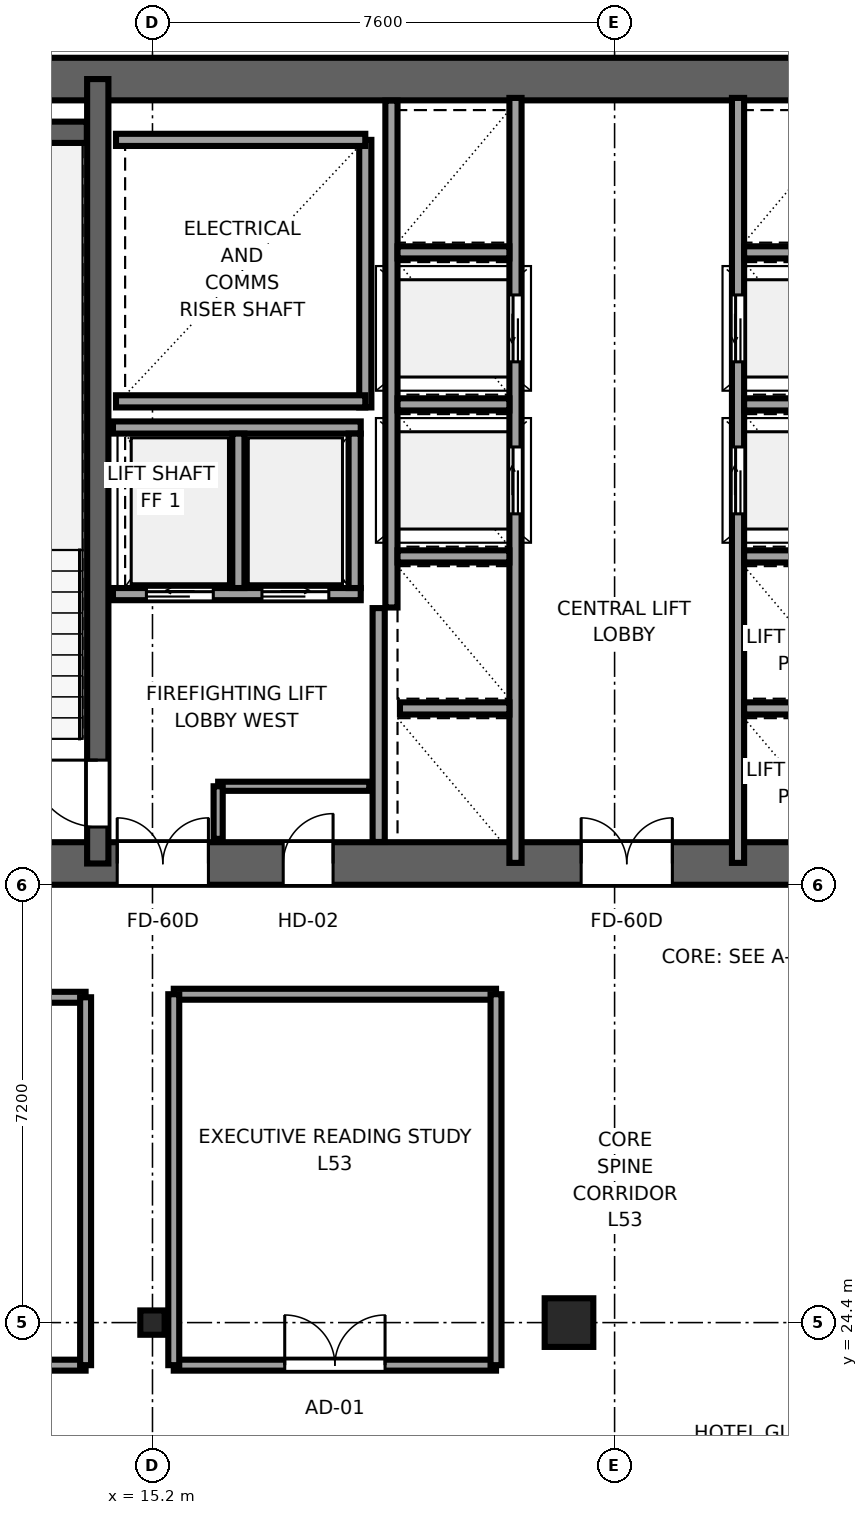
"""IFC4 building model, lengths in metres.
Left out: names, types, materials, properties, quantities, classifications, styles, units other than length and angle.
Written with IfcOpenShell. Run it as: python <this file> out.ifc"""

import sys

from ifc_helpers import new_model, si_unit, direction, frame, frame_2d, origin, origin_2d, place, context, subcontext, project, spatial, rectangle, i_section, extrude, source, transform, mapped, element, fill, save


model = new_model("IFC4")
c1 = context("Model", 3, precision=1e-05, world=origin(), true_north=direction((0.0, 1.0)))
c2 = subcontext(c1, "Body", "Model", "MODEL_VIEW")
j1 = project(units=[si_unit("LENGTHUNIT", "METRE"), si_unit("PLANEANGLEUNIT", "RADIAN")], contexts=[c1])
p1 = place(None, origin())
s1 = spatial("IfcSite", under=j1, at=p1, CompositionType="ELEMENT")
p2 = place(p1, origin())
s2 = spatial("IfcBuilding", under=s1, at=p2, CompositionType="ELEMENT")
p3 = place(p2, frame((0.0, 0.0, 201.75)))
s3 = spatial("IfcBuildingStorey", under=s2, at=p3, CompositionType="ELEMENT", Elevation=201.75)
p4 = place(p3, frame((9.8, 31.95, 0.0), z_axis=(0.0, 0.0, 1.0), x_axis=(1.0, 0.0, 0.0)))
e1 = element("IfcWall", 1, at=p4, inside=s3, PredefinedType="SHEAR", context=c2, shape_type="SweptSolid", body=[
    extrude(rectangle(XDim=26.4, YDim=0.7, at=frame_2d((13.2, 0.0))), origin(), (0.0, 0.0, 1.0), 3.55),
])
p5 = place(p4, frame((6.32, 0.0, 0.0), z_axis=(0.0, 0.0, 1.0), x_axis=(-1.0, 0.0, 0.0)))
e2 = element("IfcOpeningElement", 2, at=p5, cuts=e1, PredefinedType="OPENING", context=c2, shape_type="SweptSolid", body=[
    extrude(rectangle(XDim=1.5, YDim=2.04, at=frame_2d((0.75, 1.02))), frame((0.0, 0.36, 0.0), z_axis=(0.0, -1.0, 0.0), x_axis=(1.0, 0.0, 0.0)), (0.0, 0.0, 1.0), 0.72),
])
p6 = place(p4, frame((13.95, 0.0, 0.0), z_axis=(0.0, 0.0, 1.0), x_axis=(-1.0, 0.0, 0.0)))
e3 = element("IfcOpeningElement", 3, at=p6, cuts=e1, PredefinedType="OPENING", context=c2, shape_type="SweptSolid", body=[
    extrude(rectangle(XDim=1.5, YDim=2.04, at=frame_2d((0.75, 1.02))), frame((0.0, 0.36, 0.0), z_axis=(0.0, -1.0, 0.0), x_axis=(1.0, 0.0, 0.0)), (0.0, 0.0, 1.0), 0.72),
])
p7 = place(p4, frame((21.58, 0.0, 0.0), z_axis=(0.0, 0.0, 1.0), x_axis=(-1.0, 0.0, 0.0)))
e4 = element("IfcOpeningElement", 4, at=p7, cuts=e1, PredefinedType="OPENING", context=c2, shape_type="SweptSolid", body=[
    extrude(rectangle(XDim=1.5, YDim=2.04, at=frame_2d((0.75, 1.02))), frame((0.0, 0.36, 0.0), z_axis=(0.0, -1.0, 0.0), x_axis=(1.0, 0.0, 0.0)), (0.0, 0.0, 1.0), 0.72),
])
p8 = place(p4, frame((8.37, 0.0, 0.0), z_axis=(0.0, 0.0, 1.0), x_axis=(-1.0, 0.0, 0.0)))
e5 = element("IfcOpeningElement", 5, at=p8, cuts=e1, PredefinedType="OPENING", context=c2, shape_type="SweptSolid", body=[
    extrude(rectangle(XDim=0.82, YDim=2.01, at=frame_2d((0.41, 1.005))), frame((0.0, 0.36, 0.0), z_axis=(0.0, -1.0, 0.0), x_axis=(1.0, 0.0, 0.0)), (0.0, 0.0, 1.0), 0.72),
])
p9 = place(p4, frame((18.87, 0.0, 0.0), z_axis=(0.0, 0.0, 1.0), x_axis=(-1.0, 0.0, 0.0)))
e6 = element("IfcOpeningElement", 6, at=p9, cuts=e1, PredefinedType="OPENING", context=c2, shape_type="SweptSolid", body=[
    extrude(rectangle(XDim=0.82, YDim=2.01, at=frame_2d((0.41, 1.005))), frame((0.0, 0.36, 0.0), z_axis=(0.0, -1.0, 0.0), x_axis=(1.0, 0.0, 0.0)), (0.0, 0.0, 1.0), 0.72),
])
p10 = place(p3, frame((9.8, 44.85, 0.0), z_axis=(0.0, 0.0, 1.0), x_axis=(1.0, 0.0, 0.0)))
e7 = element("IfcWall", 7, at=p10, inside=s3, PredefinedType="SHEAR", context=c2, shape_type="SweptSolid", body=[
    extrude(rectangle(XDim=26.4, YDim=0.7, at=frame_2d((13.2, 0.0))), origin(), (0.0, 0.0, 1.0), 3.55),
])
p11 = place(p3, frame((14.3, 31.95, 0.0), z_axis=(0.0, 0.0, 1.0), x_axis=(0.0, 1.0, 0.0)))
e8 = element("IfcWall", 8, at=p11, inside=s3, PredefinedType="SHEAR", context=c2, shape_type="SweptSolid", body=[
    extrude(rectangle(XDim=12.9, YDim=0.35, at=frame_2d((6.45, 0.0))), origin(), (0.0, 0.0, 1.0), 3.55),
])
p12 = place(p11, frame((0.6, 0.0, 0.0)))
e9 = element("IfcOpeningElement", 9, at=p12, cuts=e8, PredefinedType="OPENING", context=c2, shape_type="SweptSolid", body=[
    extrude(rectangle(XDim=1.1, YDim=2.12, at=frame_2d((0.55, 1.06))), frame((0.0, 0.185, 0.0), z_axis=(0.0, -1.0, 0.0), x_axis=(1.0, 0.0, 0.0)), (0.0, 0.0, 1.0), 0.37),
])
p13 = place(p3, frame((10.52, 43.975, 0.0), z_axis=(0.0, 0.0, 1.0), x_axis=(1.0, 0.0, 0.0)))
e10 = element("IfcWall", 10, at=p13, inside=s3, PredefinedType="SHEAR", context=c2, shape_type="SweptSolid", body=[
    extrude(rectangle(XDim=3.6, YDim=0.35, at=frame_2d((1.8, 0.0))), origin(), (0.0, 0.0, 1.0), 3.55),
])
m1 = source(origin(), c2, "Body", "SweptSolid", [
    extrude(i_section(OverallWidth=0.4, OverallDepth=0.4, WebThickness=0.02, FlangeThickness=0.035, at=origin_2d()), origin(), (0.0, 0.0, 1.0), 3.55),
])
p14 = place(p3, frame((15.2, 24.4, 0.0), z_axis=(0.0, 0.0, 1.0), x_axis=(1.0, 0.0, 0.0)))
e11 = element("IfcColumn", 11, at=p14, inside=s3, PredefinedType="COLUMN", context=c2, shape_type="MappedRepresentation", body=[
    mapped(m1, transform((0.0, 0.0, 0.0), x_axis=(1.0, 0.0, 0.0), y_axis=(0.0, 1.0, 0.0), z_axis=(0.0, 0.0, 1.0), scale=1.0)),
])
m2 = source(origin(), c2, "Body", "SweptSolid", [
    extrude(rectangle(XDim=0.8, YDim=0.8, at=origin_2d()), origin(), (0.0, 0.0, 1.0), 3.55),
])
p15 = place(p3, frame((22.05, 24.4, 0.0), z_axis=(0.0, 0.0, 1.0), x_axis=(1.0, 0.0, 0.0)))
e12 = element("IfcColumn", 12, at=p15, inside=s3, PredefinedType="COLUMN", context=c2, shape_type="MappedRepresentation", body=[
    mapped(m2, transform((0.0, 0.0, 0.0), x_axis=(1.0, 0.0, 0.0), y_axis=(0.0, 1.0, 0.0), z_axis=(0.0, 0.0, 1.0), scale=1.0)),
])
p16 = place(p3, frame((18.7, 39.45, 0.0), z_axis=(0.0, 0.0, 1.0), x_axis=(0.0, 1.0, 0.0)))
e13 = element("IfcWall", 13, at=p16, inside=s3, PredefinedType="SOLIDWALL", context=c2, shape_type="SweptSolid", body=[
    extrude(rectangle(XDim=4.4, YDim=0.2, at=frame_2d((2.2, 0.0))), origin(), (0.0, 0.0, 1.0), 3.29),
])
for number, where, z_axis, x_axis in (
    (14, (14.6, 39.55, 0.0), (0.0, 0.0, 1.0), (1.0, 0.0, 0.0)),
    (15, (14.6, 43.85, 0.0), (0.0, 0.0, 1.0), (1.0, 0.0, 0.0)),
):
    element("IfcWall", number, at=place(p3, frame(where, z_axis=z_axis, x_axis=x_axis)), inside=s3, PredefinedType="SOLIDWALL", context=c2, shape_type="SweptSolid", body=[
        extrude(rectangle(XDim=4.1, YDim=0.2, at=frame_2d((2.05, 0.0))), origin(), (0.0, 0.0, 1.0), 3.29),
    ])
p17 = place(p3, frame((18.92, 32.304, 0.0), z_axis=(0.0, 0.0, 1.0), x_axis=(0.0, 1.0, 0.0)))
e16 = element("IfcWall", 16, at=p17, inside=s3, PredefinedType="SOLIDWALL", context=c2, shape_type="SweptSolid", body=[
    extrude(rectangle(XDim=3.846, YDim=0.2, at=frame_2d((1.923, 0.0))), origin(), (0.0, 0.0, 1.0), 3.29),
])
p18 = place(p3, frame((21.17, 31.96, 0.0), z_axis=(0.0, 0.0, 1.0), x_axis=(0.0, 1.0, 0.0)))
e17 = element("IfcWall", 17, at=p18, inside=s3, PredefinedType="SOLIDWALL", context=c2, shape_type="SweptSolid", body=[
    extrude(rectangle(XDim=12.58, YDim=0.2, at=frame_2d((6.29, 0.0))), origin(), (0.0, 0.0, 1.0), 3.29),
])
p19 = place(p18, frame((5.74, 0.0, 0.0)))
e18 = element("IfcOpeningElement", 18, at=p19, cuts=e17, PredefinedType="OPENING", context=c2, shape_type="SweptSolid", body=[
    extrude(rectangle(XDim=1.1, YDim=2.12, at=frame_2d((0.55, 1.06))), frame((0.0, 0.11, 0.0), z_axis=(0.0, -1.0, 0.0), x_axis=(1.0, 0.0, 0.0)), (0.0, 0.0, 1.0), 0.22),
])
p20 = place(p18, frame((8.24, 0.0, 0.0)))
e19 = element("IfcOpeningElement", 19, at=p20, cuts=e17, PredefinedType="OPENING", context=c2, shape_type="SweptSolid", body=[
    extrude(rectangle(XDim=1.1, YDim=2.12, at=frame_2d((0.55, 1.06))), frame((0.0, 0.11, 0.0), z_axis=(0.0, -1.0, 0.0), x_axis=(1.0, 0.0, 0.0)), (0.0, 0.0, 1.0), 0.22),
])
p21 = place(p3, frame((19.13, 36.16, 0.0), z_axis=(0.0, 0.0, 1.0), x_axis=(0.0, 1.0, 0.0)))
e20 = element("IfcWall", 20, at=p21, inside=s3, PredefinedType="SOLIDWALL", context=c2, shape_type="SweptSolid", body=[
    extrude(rectangle(XDim=8.336, YDim=0.2, at=frame_2d((4.168, 0.0))), origin(), (0.0, 0.0, 1.0), 3.29),
])
p22 = place(p3, frame((19.27, 34.5, 0.0), z_axis=(0.0, 0.0, 1.0), x_axis=(1.0, 0.0, 0.0)))
e21 = element("IfcWall", 21, at=p22, inside=s3, PredefinedType="SOLIDWALL", context=c2, shape_type="SweptSolid", body=[
    extrude(rectangle(XDim=1.8, YDim=0.2, at=frame_2d((0.9, 0.0))), origin(), (0.0, 0.0, 1.0), 3.29),
])
for number, where, z_axis, x_axis in (
    (22, (19.23, 37.0, 0.0), (0.0, 0.0, 1.0), (1.0, 0.0, 0.0)),
    (23, (19.23, 39.5, 0.0), (0.0, 0.0, 1.0), (1.0, 0.0, 0.0)),
    (24, (19.23, 42.0, 0.0), (0.0, 0.0, 1.0), (1.0, 0.0, 0.0)),
):
    element("IfcWall", number, at=place(p3, frame(where, z_axis=z_axis, x_axis=x_axis)), inside=s3, PredefinedType="SOLIDWALL", context=c2, shape_type="SweptSolid", body=[
        extrude(rectangle(XDim=1.84, YDim=0.2, at=frame_2d((0.92, 0.0))), origin(), (0.0, 0.0, 1.0), 3.29),
    ])
p23 = place(p3, frame((14.55, 36.38, 0.0), z_axis=(0.0, 0.0, 1.0), x_axis=(1.0, 0.0, 0.0)))
e25 = element("IfcWall", 25, at=p23, inside=s3, PredefinedType="SOLIDWALL", context=c2, shape_type="SweptSolid", body=[
    extrude(rectangle(XDim=4.075, YDim=0.2, at=frame_2d((2.038, 0.0))), origin(), (0.0, 0.0, 1.0), 3.29),
])
p24 = place(p23, frame((0.55, 0.0, 0.0)))
e26 = element("IfcOpeningElement", 26, at=p24, cuts=e25, PredefinedType="OPENING", context=c2, shape_type="SweptSolid", body=[
    extrude(rectangle(XDim=1.1, YDim=2.12, at=frame_2d((0.55, 1.06))), frame((0.0, 0.11, 0.0), z_axis=(0.0, -1.0, 0.0), x_axis=(1.0, 0.0, 0.0)), (0.0, 0.0, 1.0), 0.22),
])
p25 = place(p23, frame((2.45, 0.0, 0.0)))
e27 = element("IfcOpeningElement", 27, at=p25, cuts=e25, PredefinedType="OPENING", context=c2, shape_type="SweptSolid", body=[
    extrude(rectangle(XDim=1.1, YDim=2.12, at=frame_2d((0.55, 1.06))), frame((0.0, 0.11, 0.0), z_axis=(0.0, -1.0, 0.0), x_axis=(1.0, 0.0, 0.0)), (0.0, 0.0, 1.0), 0.22),
])
p26 = place(p3, frame((14.55, 39.12, 0.0), z_axis=(0.0, 0.0, 1.0), x_axis=(1.0, 0.0, 0.0)))
e28 = element("IfcWall", 28, at=p26, inside=s3, PredefinedType="SOLIDWALL", context=c2, shape_type="SweptSolid", body=[
    extrude(rectangle(XDim=4.075, YDim=0.2, at=frame_2d((2.038, 0.0))), origin(), (0.0, 0.0, 1.0), 3.29),
])
for number, where, z_axis, x_axis in (
    (29, (18.525, 36.48, 0.0), (0.0, 0.0, 1.0), (0.0, 1.0, 0.0)),
    (30, (16.613, 36.48, 0.0), (0.0, 0.0, 1.0), (0.0, 1.0, 0.0)),
):
    element("IfcWall", number, at=place(p3, frame(where, z_axis=z_axis, x_axis=x_axis)), inside=s3, PredefinedType="SOLIDWALL", context=c2, shape_type="SweptSolid", body=[
        extrude(rectangle(XDim=2.54, YDim=0.2, at=frame_2d((1.27, 0.0))), origin(), (0.0, 0.0, 1.0), 3.29),
    ])
p27 = place(p3, frame((24.83, 31.96, 0.0), z_axis=(0.0, 0.0, 1.0), x_axis=(0.0, 1.0, 0.0)))
e31 = element("IfcWall", 31, at=p27, inside=s3, PredefinedType="SOLIDWALL", context=c2, shape_type="SweptSolid", body=[
    extrude(rectangle(XDim=12.58, YDim=0.2, at=frame_2d((6.29, 0.0))), origin(), (0.0, 0.0, 1.0), 3.29),
])
p28 = place(p27, frame((5.74, 0.0, 0.0)))
e32 = element("IfcOpeningElement", 32, at=p28, cuts=e31, PredefinedType="OPENING", context=c2, shape_type="SweptSolid", body=[
    extrude(rectangle(XDim=1.1, YDim=2.12, at=frame_2d((0.55, 1.06))), frame((0.0, 0.11, 0.0), z_axis=(0.0, -1.0, 0.0), x_axis=(1.0, 0.0, 0.0)), (0.0, 0.0, 1.0), 0.22),
])
p29 = place(p27, frame((8.24, 0.0, 0.0)))
e33 = element("IfcOpeningElement", 33, at=p29, cuts=e31, PredefinedType="OPENING", context=c2, shape_type="SweptSolid", body=[
    extrude(rectangle(XDim=1.1, YDim=2.12, at=frame_2d((0.55, 1.06))), frame((0.0, 0.11, 0.0), z_axis=(0.0, -1.0, 0.0), x_axis=(1.0, 0.0, 0.0)), (0.0, 0.0, 1.0), 0.22),
])
p30 = place(p3, frame((24.93, 34.5, 0.0), z_axis=(0.0, 0.0, 1.0), x_axis=(1.0, 0.0, 0.0)))
e34 = element("IfcWall", 34, at=p30, inside=s3, PredefinedType="SOLIDWALL", context=c2, shape_type="SweptSolid", body=[
    extrude(rectangle(XDim=1.8, YDim=0.2, at=frame_2d((0.9, 0.0))), origin(), (0.0, 0.0, 1.0), 3.29),
])
for number, where, z_axis, x_axis in (
    (35, (24.93, 37.0, 0.0), (0.0, 0.0, 1.0), (1.0, 0.0, 0.0)),
    (36, (24.93, 39.5, 0.0), (0.0, 0.0, 1.0), (1.0, 0.0, 0.0)),
    (37, (24.93, 42.0, 0.0), (0.0, 0.0, 1.0), (1.0, 0.0, 0.0)),
):
    element("IfcWall", number, at=place(p3, frame(where, z_axis=z_axis, x_axis=x_axis)), inside=s3, PredefinedType="SOLIDWALL", context=c2, shape_type="SweptSolid", body=[
        extrude(rectangle(XDim=1.84, YDim=0.2, at=frame_2d((0.92, 0.0))), origin(), (0.0, 0.0, 1.0), 3.29),
    ])
p31 = place(p3, frame((16.28, 33.22, 0.0), z_axis=(0.0, 0.0, 1.0), x_axis=(1.0, 0.0, 0.0)))
e38 = element("IfcWall", 38, at=p31, inside=s3, PredefinedType="PARTITIONING", context=c2, shape_type="SweptSolid", body=[
    extrude(rectangle(XDim=2.485, YDim=0.15, at=frame_2d((1.242, 0.0))), origin(), (0.0, 0.0, 1.0), 3.29),
])
p32 = place(p3, frame((16.28, 32.355, 0.0), z_axis=(0.0, 0.0, 1.0), x_axis=(0.0, 1.0, 0.0)))
e39 = element("IfcWall", 39, at=p32, inside=s3, PredefinedType="PARTITIONING", context=c2, shape_type="SweptSolid", body=[
    extrude(rectangle(XDim=0.865, YDim=0.15, at=frame_2d((0.433, 0.0))), origin(), (0.0, 0.0, 1.0), 3.29),
])
p33 = place(p3, frame((9.88, 23.7, 0.0), z_axis=(0.0, 0.0, 1.0), x_axis=(1.0, 0.0, 0.0)))
e40 = element("IfcWall", 40, at=p33, inside=s3, PredefinedType="PARTITIONING", context=c2, shape_type="SweptSolid", body=[
    extrude(rectangle(XDim=4.22, YDim=0.18, at=frame_2d((2.11, 0.0))), origin(), (0.0, 0.0, 1.0), 3.29),
])
p34 = place(p33, frame((1.285, 0.0, 0.0)))
e41 = element("IfcOpeningElement", 41, at=p34, cuts=e40, PredefinedType="OPENING", context=c2, shape_type="SweptSolid", body=[
    extrude(rectangle(XDim=1.65, YDim=2.15, at=frame_2d((0.825, 1.075))), frame((0.0, 0.1, 0.0), z_axis=(0.0, -1.0, 0.0), x_axis=(1.0, 0.0, 0.0)), (0.0, 0.0, 1.0), 0.2),
])
p35 = place(p3, frame((9.88, 29.75, 0.0), z_axis=(0.0, 0.0, 1.0), x_axis=(1.0, 0.0, 0.0)))
e42 = element("IfcWall", 42, at=p35, inside=s3, PredefinedType="PARTITIONING", context=c2, shape_type="SweptSolid", body=[
    extrude(rectangle(XDim=4.22, YDim=0.18, at=frame_2d((2.11, 0.0))), origin(), (0.0, 0.0, 1.0), 3.29),
])
p36 = place(p3, frame((14.1, 23.7, 0.0), z_axis=(0.0, 0.0, 1.0), x_axis=(0.0, 1.0, 0.0)))
e43 = element("IfcWall", 43, at=p36, inside=s3, PredefinedType="PARTITIONING", context=c2, shape_type="SweptSolid", body=[
    extrude(rectangle(XDim=6.05, YDim=0.18, at=frame_2d((3.025, 0.0))), origin(), (0.0, 0.0, 1.0), 3.29),
])
p37 = place(p3, frame((15.55, 23.7, 0.0), z_axis=(0.0, 0.0, 1.0), x_axis=(1.0, 0.0, 0.0)))
e44 = element("IfcWall", 44, at=p37, inside=s3, PredefinedType="PARTITIONING", context=c2, shape_type="SweptSolid", body=[
    extrude(rectangle(XDim=5.3, YDim=0.18, at=frame_2d((2.65, 0.0))), origin(), (0.0, 0.0, 1.0), 3.29),
])
p38 = place(p37, frame((1.825, 0.0, 0.0)))
e45 = element("IfcOpeningElement", 45, at=p38, cuts=e44, PredefinedType="OPENING", context=c2, shape_type="SweptSolid", body=[
    extrude(rectangle(XDim=1.65, YDim=2.15, at=frame_2d((0.825, 1.075))), frame((0.0, 0.1, 0.0), z_axis=(0.0, -1.0, 0.0), x_axis=(1.0, 0.0, 0.0)), (0.0, 0.0, 1.0), 0.2),
])
p39 = place(p3, frame((15.55, 29.8, 0.0), z_axis=(0.0, 0.0, 1.0), x_axis=(1.0, 0.0, 0.0)))
e46 = element("IfcWall", 46, at=p39, inside=s3, PredefinedType="PARTITIONING", context=c2, shape_type="SweptSolid", body=[
    extrude(rectangle(XDim=5.3, YDim=0.18, at=frame_2d((2.65, 0.0))), origin(), (0.0, 0.0, 1.0), 3.29),
])
for number, where, z_axis, x_axis in (
    (47, (15.55, 23.7, 0.0), (0.0, 0.0, 1.0), (0.0, 1.0, 0.0)),
    (48, (20.85, 23.7, 0.0), (0.0, 0.0, 1.0), (0.0, 1.0, 0.0)),
):
    element("IfcWall", number, at=place(p3, frame(where, z_axis=z_axis, x_axis=x_axis)), inside=s3, PredefinedType="PARTITIONING", context=c2, shape_type="SweptSolid", body=[
        extrude(rectangle(XDim=6.1, YDim=0.18, at=frame_2d((3.05, 0.0))), origin(), (0.0, 0.0, 1.0), 3.29),
    ])
m3 = source(origin(), c2, "Body", "SweptSolid", [
    extrude(rectangle(XDim=1.1, YDim=2.12, at=frame_2d((0.55, 1.06))), frame((0.0, 0.025, 0.0), z_axis=(0.0, -1.0, 0.0), x_axis=(1.0, 0.0, 0.0)), (0.0, 0.0, 1.0), 0.05),
])
p40 = place(p12, origin())
e49 = element("IfcDoor", 49, at=p40, inside=s3, OperationType="SINGLE_SWING_RIGHT", PredefinedType="DOOR", context=c2, shape_type="MappedRepresentation", body=[
    mapped(m3, transform((0.0, 0.0, 0.0), x_axis=(1.0, 0.0, 0.0), y_axis=(0.0, 1.0, 0.0), z_axis=(0.0, 0.0, 1.0), scale=1.0)),
])
fill(e9, e49)
m4 = source(origin(), c2, "Body", "SweptSolid", [
    extrude(rectangle(XDim=1.5, YDim=2.04, at=frame_2d((0.75, 1.02))), frame((0.0, 0.025, 0.0), z_axis=(0.0, -1.0, 0.0), x_axis=(1.0, 0.0, 0.0)), (0.0, 0.0, 1.0), 0.05),
])
p41 = place(p5, origin())
e50 = element("IfcDoor", 50, at=p41, inside=s3, OperationType="DOUBLE_DOOR_SINGLE_SWING", PredefinedType="DOOR", context=c2, shape_type="MappedRepresentation", body=[
    mapped(m4, transform((0.0, 0.0, 0.0), x_axis=(1.0, 0.0, 0.0), y_axis=(0.0, 1.0, 0.0), z_axis=(0.0, 0.0, 1.0), scale=1.0)),
])
fill(e2, e50)
p42 = place(p6, origin())
e51 = element("IfcDoor", 51, at=p42, inside=s3, OperationType="DOUBLE_DOOR_SINGLE_SWING", PredefinedType="DOOR", context=c2, shape_type="MappedRepresentation", body=[
    mapped(m4, transform((0.0, 0.0, 0.0), x_axis=(1.0, 0.0, 0.0), y_axis=(0.0, 1.0, 0.0), z_axis=(0.0, 0.0, 1.0), scale=1.0)),
])
fill(e3, e51)
m5 = source(origin(), c2, "Body", "SweptSolid", [
    extrude(rectangle(XDim=0.82, YDim=2.01, at=frame_2d((0.41, 1.005))), frame((0.0, 0.025, 0.0), z_axis=(0.0, -1.0, 0.0), x_axis=(1.0, 0.0, 0.0)), (0.0, 0.0, 1.0), 0.05),
])
p43 = place(p8, origin())
e52 = element("IfcDoor", 52, at=p43, inside=s3, OperationType="SINGLE_SWING_RIGHT", PredefinedType="DOOR", context=c2, shape_type="MappedRepresentation", body=[
    mapped(m5, transform((0.0, 0.0, 0.0), x_axis=(1.0, 0.0, 0.0), y_axis=(0.0, 1.0, 0.0), z_axis=(0.0, 0.0, 1.0), scale=1.0)),
])
fill(e5, e52)
m6 = source(origin(), c2, "Body", "SweptSolid", [
    extrude(rectangle(XDim=1.1, YDim=2.12, at=frame_2d((0.55, 1.06))), frame((0.0, 0.025, 0.0), z_axis=(0.0, -1.0, 0.0), x_axis=(1.0, 0.0, 0.0)), (0.0, 0.0, 1.0), 0.05),
])
p44 = place(p19, origin())
e53 = element("IfcDoor", 53, at=p44, inside=s3, OperationType="SLIDING_TO_RIGHT", PredefinedType="DOOR", context=c2, shape_type="MappedRepresentation", body=[
    mapped(m6, transform((0.0, 0.0, 0.0), x_axis=(1.0, 0.0, 0.0), y_axis=(0.0, 1.0, 0.0), z_axis=(0.0, 0.0, 1.0), scale=1.0)),
])
fill(e18, e53)
p45 = place(p20, origin())
e54 = element("IfcDoor", 54, at=p45, inside=s3, OperationType="SLIDING_TO_LEFT", PredefinedType="DOOR", context=c2, shape_type="MappedRepresentation", body=[
    mapped(m6, transform((0.0, 0.0, 0.0), x_axis=(1.0, 0.0, 0.0), y_axis=(0.0, 1.0, 0.0), z_axis=(0.0, 0.0, 1.0), scale=1.0)),
])
fill(e19, e54)
p46 = place(p24, origin())
e55 = element("IfcDoor", 55, at=p46, inside=s3, OperationType="SLIDING_TO_LEFT", PredefinedType="DOOR", context=c2, shape_type="MappedRepresentation", body=[
    mapped(m6, transform((0.0, 0.0, 0.0), x_axis=(1.0, 0.0, 0.0), y_axis=(0.0, 1.0, 0.0), z_axis=(0.0, 0.0, 1.0), scale=1.0)),
])
fill(e26, e55)
p47 = place(p25, origin())
e56 = element("IfcDoor", 56, at=p47, inside=s3, OperationType="SLIDING_TO_RIGHT", PredefinedType="DOOR", context=c2, shape_type="MappedRepresentation", body=[
    mapped(m6, transform((0.0, 0.0, 0.0), x_axis=(1.0, 0.0, 0.0), y_axis=(0.0, 1.0, 0.0), z_axis=(0.0, 0.0, 1.0), scale=1.0)),
])
fill(e27, e56)
p48 = place(p28, origin())
e57 = element("IfcDoor", 57, at=p48, inside=s3, OperationType="SLIDING_TO_RIGHT", PredefinedType="DOOR", context=c2, shape_type="MappedRepresentation", body=[
    mapped(m6, transform((0.0, 0.0, 0.0), x_axis=(1.0, 0.0, 0.0), y_axis=(0.0, 1.0, 0.0), z_axis=(0.0, 0.0, 1.0), scale=1.0)),
])
fill(e32, e57)
p49 = place(p29, origin())
e58 = element("IfcDoor", 58, at=p49, inside=s3, OperationType="SLIDING_TO_LEFT", PredefinedType="DOOR", context=c2, shape_type="MappedRepresentation", body=[
    mapped(m6, transform((0.0, 0.0, 0.0), x_axis=(1.0, 0.0, 0.0), y_axis=(0.0, 1.0, 0.0), z_axis=(0.0, 0.0, 1.0), scale=1.0)),
])
fill(e33, e58)
m7 = source(origin(), c2, "Body", "SweptSolid", [
    extrude(rectangle(XDim=1.65, YDim=2.15, at=frame_2d((0.825, 1.075))), frame((0.0, 0.025, 0.0), z_axis=(0.0, -1.0, 0.0), x_axis=(1.0, 0.0, 0.0)), (0.0, 0.0, 1.0), 0.05),
])
p50 = place(p38, origin())
e59 = element("IfcDoor", 59, at=p50, inside=s3, OperationType="DOUBLE_DOOR_SINGLE_SWING", PredefinedType="DOOR", context=c2, shape_type="MappedRepresentation", body=[
    mapped(m7, transform((0.0, 0.0, 0.0), x_axis=(1.0, 0.0, 0.0), y_axis=(0.0, 1.0, 0.0), z_axis=(0.0, 0.0, 1.0), scale=1.0)),
])
fill(e45, e59)
save(model, sys.argv[1])
